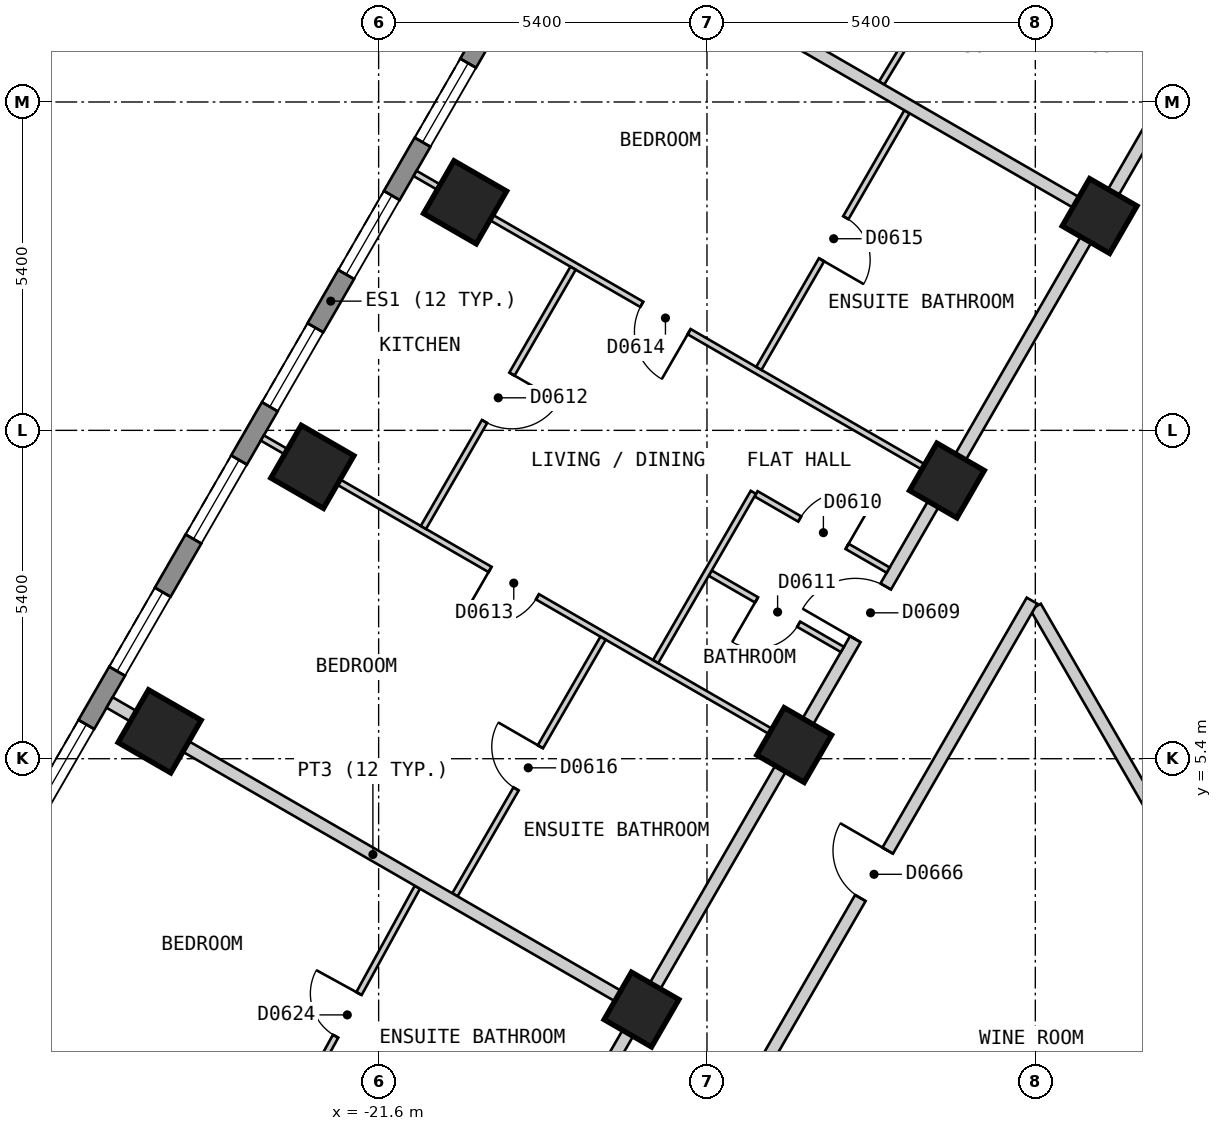
"""IFC4 building model, lengths in metres.
Left out: names, types, materials, properties, quantities, classifications, styles, units other than length and angle.
Written with IfcOpenShell. Run it as: python <this file> out.ifc"""

import sys

from ifc_helpers import new_model, si_unit, direction, frame, frame_2d, origin, origin_2d, place, context, subcontext, project, spatial, polyline, rectangle, outline, extrude, element, fill, save


model = new_model("IFC4")
c1 = context("Model", 3, precision=1e-05, world=origin(), true_north=direction((0.0, 1.0)))
c2 = subcontext(c1, "Body", "Model", "MODEL_VIEW")
j1 = project(units=[si_unit("LENGTHUNIT", "METRE"), si_unit("PLANEANGLEUNIT", "RADIAN")], contexts=[c1])
p1 = place(None, origin())
s1 = spatial("IfcSite", under=j1, at=p1, CompositionType="ELEMENT")
p2 = place(p1, origin())
s2 = spatial("IfcBuilding", under=s1, at=p2, CompositionType="ELEMENT")
p3 = place(p2, frame((0.0, 0.0, 81.0)))
s3 = spatial("IfcBuildingStorey", under=s2, at=p3, CompositionType="ELEMENT", Elevation=81.0)
for number, where, z_axis, x_axis in (
    (1, (-20.178, 14.55, 0.0), (0.0, 0.0, 1.0), (-0.5, -0.866, 0.0)),
    (2, (-22.69, 10.2, 0.0), (0.0, 0.0, 1.0), (-0.5, -0.866, 0.0)),
    (3, (-25.202, 5.85, 0.0), (0.0, 0.0, 1.0), (-0.5, -0.866, 0.0)),
):
    element("IfcColumn", number, at=place(p3, frame(where, z_axis=z_axis, x_axis=x_axis)), inside=s3, PredefinedType="COLUMN", context=c2, shape_type="SweptSolid", body=[
        extrude(rectangle(XDim=1.0, YDim=1.0, at=origin_2d()), origin(), (0.0, 0.0, 1.0), 3.0),
    ])
for number, where, z_axis, x_axis in (
    (4, (-9.743, 14.325, 0.0), (0.0, 0.0, 1.0), (-0.5, -0.866, 0.0)),
    (5, (-12.254, 9.975, 0.0), (0.0, 0.0, 1.0), (-0.5, -0.866, 0.0)),
    (6, (-14.766, 5.625, 0.0), (0.0, 0.0, 1.0), (-0.5, -0.866, 0.0)),
    (7, (-17.277, 1.275, 0.0), (0.0, 0.0, 1.0), (-0.5, -0.866, 0.0)),
):
    element("IfcColumn", number, at=place(p3, frame(where, z_axis=z_axis, x_axis=x_axis)), inside=s3, PredefinedType="COLUMN", context=c2, shape_type="SweptSolid", body=[
        extrude(rectangle(XDim=0.9, YDim=0.9, at=origin_2d()), origin(), (0.0, 0.0, 1.0), 3.0),
    ])
p4 = place(p3, frame((-15.747, 24.425, 0.0), z_axis=(0.0, 0.0, 1.0), x_axis=(-0.500027479704, -0.866009537788, 0.0)))
e8 = element("IfcWall", 8, at=p4, inside=s3, PredefinedType="SOLIDWALL", context=c2, shape_type="SweptSolid", body=[
    extrude(outline(polyline([(0.0, -0.15), (26.559, -0.15), (26.478, 0.15), (0.08, 0.15), (0.0, -0.15)])), origin(), (0.0, 0.0, 1.0), 2.7),
])
p5 = place(p4, frame((1.227, 0.0, 0.15)))
e9 = element("IfcOpeningElement", 9, at=p5, cuts=e8, PredefinedType="OPENING", context=c2, shape_type="SweptSolid", body=[
    extrude(rectangle(XDim=1.5, YDim=2.1, at=frame_2d((0.75, 1.05))), frame((0.0, 0.16, 0.0), z_axis=(0.0, -1.0, 0.0), x_axis=(1.0, 0.0, 0.0)), (0.0, 0.0, 1.0), 0.32),
])
p6 = place(p4, frame((3.739, 0.0, 0.15)))
e10 = element("IfcOpeningElement", 10, at=p6, cuts=e8, PredefinedType="OPENING", context=c2, shape_type="SweptSolid", body=[
    extrude(rectangle(XDim=1.5, YDim=2.1, at=frame_2d((0.75, 1.05))), frame((0.0, 0.16, 0.0), z_axis=(0.0, -1.0, 0.0), x_axis=(1.0, 0.0, 0.0)), (0.0, 0.0, 1.0), 0.32),
])
p7 = place(p4, frame((6.25, 0.0, 0.15)))
e11 = element("IfcOpeningElement", 11, at=p7, cuts=e8, PredefinedType="OPENING", context=c2, shape_type="SweptSolid", body=[
    extrude(rectangle(XDim=1.5, YDim=2.1, at=frame_2d((0.75, 1.05))), frame((0.0, 0.16, 0.0), z_axis=(0.0, -1.0, 0.0), x_axis=(1.0, 0.0, 0.0)), (0.0, 0.0, 1.0), 0.32),
])
p8 = place(p4, frame((8.761, 0.0, 0.15)))
e12 = element("IfcOpeningElement", 12, at=p8, cuts=e8, PredefinedType="OPENING", context=c2, shape_type="SweptSolid", body=[
    extrude(rectangle(XDim=1.5, YDim=2.1, at=frame_2d((0.75, 1.05))), frame((0.0, 0.16, 0.0), z_axis=(0.0, -1.0, 0.0), x_axis=(1.0, 0.0, 0.0)), (0.0, 0.0, 1.0), 0.32),
])
p9 = place(p4, frame((11.273, 0.0, 0.15)))
e13 = element("IfcOpeningElement", 13, at=p9, cuts=e8, PredefinedType="OPENING", context=c2, shape_type="SweptSolid", body=[
    extrude(rectangle(XDim=1.5, YDim=2.1, at=frame_2d((0.75, 1.05))), frame((0.0, 0.16, 0.0), z_axis=(0.0, -1.0, 0.0), x_axis=(1.0, 0.0, 0.0)), (0.0, 0.0, 1.0), 0.32),
])
p10 = place(p4, frame((13.785, 0.0, 0.15)))
e14 = element("IfcOpeningElement", 14, at=p10, cuts=e8, PredefinedType="OPENING", context=c2, shape_type="SweptSolid", body=[
    extrude(rectangle(XDim=1.5, YDim=2.1, at=frame_2d((0.75, 1.05))), frame((0.0, 0.16, 0.0), z_axis=(0.0, -1.0, 0.0), x_axis=(1.0, 0.0, 0.0)), (0.0, 0.0, 1.0), 0.32),
])
p11 = place(p4, frame((16.296, 0.0, 0.15)))
e15 = element("IfcOpeningElement", 15, at=p11, cuts=e8, PredefinedType="OPENING", context=c2, shape_type="SweptSolid", body=[
    extrude(rectangle(XDim=1.5, YDim=2.1, at=frame_2d((0.75, 1.05))), frame((0.0, 0.16, 0.0), z_axis=(0.0, -1.0, 0.0), x_axis=(1.0, 0.0, 0.0)), (0.0, 0.0, 1.0), 0.32),
])
p12 = place(p4, frame((18.807, 0.0, 0.15)))
e16 = element("IfcOpeningElement", 16, at=p12, cuts=e8, PredefinedType="OPENING", context=c2, shape_type="SweptSolid", body=[
    extrude(rectangle(XDim=1.5, YDim=2.1, at=frame_2d((0.75, 1.05))), frame((0.0, 0.16, 0.0), z_axis=(0.0, -1.0, 0.0), x_axis=(1.0, 0.0, 0.0)), (0.0, 0.0, 1.0), 0.32),
])
p13 = place(p4, frame((21.319, 0.0, 0.15)))
e17 = element("IfcOpeningElement", 17, at=p13, cuts=e8, PredefinedType="OPENING", context=c2, shape_type="SweptSolid", body=[
    extrude(rectangle(XDim=1.5, YDim=2.1, at=frame_2d((0.75, 1.05))), frame((0.0, 0.16, 0.0), z_axis=(0.0, -1.0, 0.0), x_axis=(1.0, 0.0, 0.0)), (0.0, 0.0, 1.0), 0.32),
])
p14 = place(p4, frame((23.831, 0.0, 0.15)))
e18 = element("IfcOpeningElement", 18, at=p14, cuts=e8, PredefinedType="OPENING", context=c2, shape_type="SweptSolid", body=[
    extrude(rectangle(XDim=1.5, YDim=2.1, at=frame_2d((0.75, 1.05))), frame((0.0, 0.16, 0.0), z_axis=(0.0, -1.0, 0.0), x_axis=(1.0, 0.0, 0.0)), (0.0, 0.0, 1.0), 0.32),
])
p15 = place(p3, frame((-10.796, 7.899, 0.0), z_axis=(0.0, 0.0, 1.0), x_axis=(0.500010383074, -0.866019409031, 0.0)))
e19 = element("IfcWall", 19, at=p15, inside=s3, PredefinedType="PARTITIONING", context=c2, shape_type="SweptSolid", body=[
    extrude(rectangle(XDim=7.535, YDim=0.2, at=frame_2d((3.768, 0.0))), origin(), (0.0, 0.0, 1.0), 2.7),
])
p16 = place(p3, frame((-16.05, -1.0, 0.0), z_axis=(0.0, 0.0, 1.0), x_axis=(0.499962449088, 0.866047082728, 0.0)))
e20 = element("IfcWall", 20, at=p16, inside=s3, PredefinedType="PARTITIONING", context=c2, shape_type="SweptSolid", body=[
    extrude(rectangle(XDim=10.391, YDim=0.2, at=frame_2d((5.195, 0.0))), origin(), (0.0, 0.0, 1.0), 2.7),
])
p17 = place(p16, frame((4.745, 0.0, 0.0)))
e21 = element("IfcOpeningElement", 21, at=p17, cuts=e20, PredefinedType="OPENING", context=c2, shape_type="SweptSolid", body=[
    extrude(rectangle(XDim=0.9, YDim=2.1, at=frame_2d((0.45, 1.05))), frame((0.0, 0.11, 0.0), z_axis=(0.0, -1.0, 0.0), x_axis=(1.0, 0.0, 0.0)), (0.0, 0.0, 1.0), 0.22),
])
p18 = place(p3, frame((-18.562, -0.951, 0.0), z_axis=(0.0, 0.0, 1.0), x_axis=(0.499992962407, 0.866029466902, 0.0)))
e22 = element("IfcWall", 22, at=p18, inside=s3, PredefinedType="PARTITIONING", context=c2, shape_type="SweptSolid", body=[
    extrude(rectangle(XDim=20.208, YDim=0.2, at=frame_2d((10.104, 0.0))), origin(), (0.0, 0.0, 1.0), 2.7),
])
p19 = place(p18, frame((9.604, 0.0, 0.0)))
e23 = element("IfcOpeningElement", 23, at=p19, cuts=e22, PredefinedType="OPENING", context=c2, shape_type="SweptSolid", body=[
    extrude(rectangle(XDim=1.0, YDim=2.1, at=frame_2d((0.5, 1.05))), frame((0.0, 0.11, 0.0), z_axis=(0.0, -1.0, 0.0), x_axis=(1.0, 0.0, 0.0)), (0.0, 0.0, 1.0), 0.22),
])
p20 = place(p3, frame((-10.742, 20.606, 0.0), z_axis=(0.0, 0.0, 1.0), x_axis=(0.50003312339, -0.866006279142, 0.0)))
e24 = element("IfcWall", 24, at=p20, inside=s3, PredefinedType="PARTITIONING", context=c2, shape_type="SweptSolid", body=[
    extrude(rectangle(XDim=4.626, YDim=0.1, at=frame_2d((2.313, 0.0))), origin(), (0.0, 0.0, 1.0), 2.7),
])
p21 = place(p3, frame((-16.147, 8.452, 0.0), z_axis=(0.0, 0.0, 1.0), x_axis=(0.866080321209, -0.499904868165, 0.0)))
e25 = element("IfcWall", 25, at=p21, inside=s3, PredefinedType="PARTITIONING", context=c2, shape_type="SweptSolid", body=[
    extrude(rectangle(XDim=2.51, YDim=0.1, at=frame_2d((1.255, 0.0))), origin(), (0.0, 0.0, 1.0), 2.7),
])
p22 = place(p21, frame((0.88, 0.0, 0.0)))
e26 = element("IfcOpeningElement", 26, at=p22, cuts=e25, PredefinedType="OPENING", context=c2, shape_type="SweptSolid", body=[
    extrude(rectangle(XDim=0.8, YDim=2.1, at=frame_2d((0.4, 1.05))), frame((0.0, 0.06, 0.0), z_axis=(0.0, -1.0, 0.0), x_axis=(1.0, 0.0, 0.0)), (0.0, 0.0, 1.0), 0.12),
])
p23 = place(p3, frame((-23.513, 10.675, 0.0), z_axis=(0.0, 0.0, 1.0), x_axis=(0.866041268327, -0.499972520799, 0.0)))
e27 = element("IfcWall", 27, at=p23, inside=s3, PredefinedType="PARTITIONING", context=c2, shape_type="SweptSolid", body=[
    extrude(rectangle(XDim=10.0, YDim=0.1, at=frame_2d((5.0, 0.0))), origin(), (0.0, 0.0, 1.0), 2.7),
])
p24 = place(p23, frame((4.325, 0.0, 0.0)))
e28 = element("IfcOpeningElement", 28, at=p24, cuts=e27, PredefinedType="OPENING", context=c2, shape_type="SweptSolid", body=[
    extrude(rectangle(XDim=0.9, YDim=2.1, at=frame_2d((0.45, 1.05))), frame((0.0, 0.06, 0.0), z_axis=(0.0, -1.0, 0.0), x_axis=(1.0, 0.0, 0.0)), (0.0, 0.0, 1.0), 0.12),
])
p25 = place(p3, frame((-15.393, 9.757, 0.0), z_axis=(0.0, 0.0, 1.0), x_axis=(0.865940918122, -0.500146304917, 0.0)))
e29 = element("IfcWall", 29, at=p25, inside=s3, PredefinedType="PARTITIONING", context=c2, shape_type="SweptSolid", body=[
    extrude(rectangle(XDim=2.51, YDim=0.1, at=frame_2d((1.255, 0.0))), origin(), (0.0, 0.0, 1.0), 2.7),
])
p26 = place(p25, frame((0.829, 0.0, 0.0)))
e30 = element("IfcOpeningElement", 30, at=p26, cuts=e29, PredefinedType="OPENING", context=c2, shape_type="SweptSolid", body=[
    extrude(rectangle(XDim=0.9, YDim=2.1, at=frame_2d((0.45, 1.05))), frame((0.0, 0.06, 0.0), z_axis=(0.0, -1.0, 0.0), x_axis=(1.0, 0.0, 0.0)), (0.0, 0.0, 1.0), 0.12),
])
p27 = place(p3, frame((-21.001, 15.025, 0.0), z_axis=(0.0, 0.0, 1.0), x_axis=(0.866016855193, -0.500014806302, 0.0)))
e31 = element("IfcWall", 31, at=p27, inside=s3, PredefinedType="PARTITIONING", context=c2, shape_type="SweptSolid", body=[
    extrude(rectangle(XDim=10.0, YDim=0.1, at=frame_2d((5.0, 0.0))), origin(), (0.0, 0.0, 1.0), 2.7),
])
p28 = place(p27, frame((4.305, 0.0, 0.0)))
e32 = element("IfcOpeningElement", 32, at=p28, cuts=e31, PredefinedType="OPENING", context=c2, shape_type="SweptSolid", body=[
    extrude(rectangle(XDim=0.9, YDim=2.1, at=frame_2d((0.45, 1.05))), frame((0.0, 0.06, 0.0), z_axis=(0.0, -1.0, 0.0), x_axis=(1.0, 0.0, 0.0)), (0.0, 0.0, 1.0), 0.12),
])
p29 = place(p3, frame((-13.328, 16.511, 0.0), z_axis=(0.0, 0.0, 1.0), x_axis=(0.518570528669, 0.855034857065, 0.0)))
e33 = element("IfcWall", 33, at=p29, inside=s3, PredefinedType="PARTITIONING", context=c2, shape_type="SweptSolid", body=[
    extrude(rectangle(XDim=4.83, YDim=0.1, at=frame_2d((2.415, 0.0))), origin(), (0.0, 0.0, 1.0), 2.7),
])
p30 = place(p29, frame((1.995, 0.0, 0.0)))
e34 = element("IfcOpeningElement", 34, at=p30, cuts=e33, PredefinedType="OPENING", context=c2, shape_type="SweptSolid", body=[
    extrude(rectangle(XDim=0.8, YDim=2.1, at=frame_2d((0.4, 1.05))), frame((0.0, 0.06, 0.0), z_axis=(0.0, -1.0, 0.0), x_axis=(1.0, 0.0, 0.0)), (0.0, 0.0, 1.0), 0.12),
])
p31 = place(p3, frame((-17.044, 6.999, 0.0), z_axis=(0.0, 0.0, 1.0), x_axis=(0.500176309913, 0.865923587277, 0.0)))
e35 = element("IfcWall", 35, at=p31, inside=s3, PredefinedType="PARTITIONING", context=c2, shape_type="SweptSolid", body=[
    extrude(rectangle(XDim=3.213, YDim=0.1, at=frame_2d((1.606, 0.0))), origin(), (0.0, 0.0, 1.0), 2.7),
])
p32 = place(p3, frame((-20.345, 3.162, 0.0), z_axis=(0.0, 0.0, 1.0), x_axis=(0.499943653708, 0.866057932887, 0.0)))
e36 = element("IfcWall", 36, at=p32, inside=s3, PredefinedType="PARTITIONING", context=c2, shape_type="SweptSolid", body=[
    extrude(rectangle(XDim=4.873, YDim=0.1, at=frame_2d((2.436, 0.0))), origin(), (0.0, 0.0, 1.0), 2.7),
])
p33 = place(p32, frame((2.011, 0.0, 0.0)))
e37 = element("IfcOpeningElement", 37, at=p33, cuts=e36, PredefinedType="OPENING", context=c2, shape_type="SweptSolid", body=[
    extrude(rectangle(XDim=0.8, YDim=2.1, at=frame_2d((0.4, 1.05))), frame((0.0, 0.06, 0.0), z_axis=(0.0, -1.0, 0.0), x_axis=(1.0, 0.0, 0.0)), (0.0, 0.0, 1.0), 0.12),
])
p34 = place(p3, frame((-15.347, 11.819, 0.0), z_axis=(0.0, 0.0, 1.0), x_axis=(0.499943653708, 0.866057932887, 0.0)))
e38 = element("IfcWall", 38, at=p34, inside=s3, PredefinedType="PARTITIONING", context=c2, shape_type="SweptSolid", body=[
    extrude(rectangle(XDim=4.873, YDim=0.1, at=frame_2d((2.436, 0.0))), origin(), (0.0, 0.0, 1.0), 2.7),
])
p35 = place(p34, frame((2.062, 0.0, 0.0)))
e39 = element("IfcOpeningElement", 39, at=p35, cuts=e38, PredefinedType="OPENING", context=c2, shape_type="SweptSolid", body=[
    extrude(rectangle(XDim=0.8, YDim=2.1, at=frame_2d((0.4, 1.05))), frame((0.0, 0.06, 0.0), z_axis=(0.0, -1.0, 0.0), x_axis=(1.0, 0.0, 0.0)), (0.0, 0.0, 1.0), 0.12),
])
p36 = place(p3, frame((-20.864, 9.203, 0.0), z_axis=(0.0, 0.0, 1.0), x_axis=(0.500000007376, 0.866025399526, 0.0)))
e40 = element("IfcWall", 40, at=p36, inside=s3, PredefinedType="PARTITIONING", context=c2, shape_type="SweptSolid", body=[
    extrude(rectangle(XDim=4.924, YDim=0.1, at=frame_2d((2.462, 0.0))), origin(), (0.0, 0.0, 1.0), 2.7),
])
p37 = place(p36, frame((2.012, 0.0, 0.0)))
e41 = element("IfcOpeningElement", 41, at=p37, cuts=e40, PredefinedType="OPENING", context=c2, shape_type="SweptSolid", body=[
    extrude(rectangle(XDim=0.9, YDim=2.1, at=frame_2d((0.45, 1.05))), frame((0.0, 0.06, 0.0), z_axis=(0.0, -1.0, 0.0), x_axis=(1.0, 0.0, 0.0)), (0.0, 0.0, 1.0), 0.12),
])
p38 = place(p3, frame((-23.289, -0.951, 0.0), z_axis=(0.0, 0.0, 1.0), x_axis=(0.481164463081, 0.876630343684, 0.0)))
e42 = element("IfcWall", 42, at=p38, inside=s3, PredefinedType="PARTITIONING", context=c2, shape_type="SweptSolid", body=[
    extrude(rectangle(XDim=4.834, YDim=0.1, at=frame_2d((2.417, 0.0))), origin(), (0.0, 0.0, 1.0), 2.7),
])
p39 = place(p38, frame((2.039, 0.0, 0.0)))
e43 = element("IfcOpeningElement", 43, at=p39, cuts=e42, PredefinedType="OPENING", context=c2, shape_type="SweptSolid", body=[
    extrude(rectangle(XDim=0.8, YDim=2.1, at=frame_2d((0.4, 1.05))), frame((0.0, 0.06, 0.0), z_axis=(0.0, -1.0, 0.0), x_axis=(1.0, 0.0, 0.0)), (0.0, 0.0, 1.0), 0.12),
])
p40 = place(p3, frame((-26.025, 6.325, 0.0), z_axis=(0.0, 0.0, 1.0), x_axis=(0.866041268327, -0.499972520799, 0.0)))
e44 = element("IfcWall", 44, at=p40, inside=s3, PredefinedType="PARTITIONING", context=c2, shape_type="SweptSolid", body=[
    extrude(rectangle(XDim=10.0, YDim=0.2, at=frame_2d((5.0, 0.0))), origin(), (0.0, 0.0, 1.0), 2.7),
])
p41 = place(p3, frame((-18.489, 19.375, 0.0), z_axis=(0.0, 0.0, 1.0), x_axis=(0.866016855193, -0.500014806302, 0.0)))
e45 = element("IfcWall", 45, at=p41, inside=s3, PredefinedType="PARTITIONING", context=c2, shape_type="SweptSolid", body=[
    extrude(rectangle(XDim=10.0, YDim=0.2, at=frame_2d((5.0, 0.0))), origin(), (0.0, 0.0, 1.0), 2.7),
])
p42 = place(p8, origin())
e46 = element("IfcWindow", 46, at=p42, inside=s3, PartitioningType="SINGLE_PANEL", PredefinedType="WINDOW", context=c2, shape_type="SweptSolid", body=[
    extrude(rectangle(XDim=1.5, YDim=2.1, at=frame_2d((0.75, 1.05))), frame((0.0, 0.03, 0.0), z_axis=(0.0, -1.0, 0.0), x_axis=(1.0, 0.0, 0.0)), (0.0, 0.0, 1.0), 0.06),
])
fill(e12, e46)
p43 = place(p9, origin())
e47 = element("IfcWindow", 47, at=p43, inside=s3, PartitioningType="SINGLE_PANEL", PredefinedType="WINDOW", context=c2, shape_type="SweptSolid", body=[
    extrude(rectangle(XDim=1.5, YDim=2.1, at=frame_2d((0.75, 1.05))), frame((0.0, 0.03, 0.0), z_axis=(0.0, -1.0, 0.0), x_axis=(1.0, 0.0, 0.0)), (0.0, 0.0, 1.0), 0.06),
])
fill(e13, e47)
p44 = place(p10, origin())
e48 = element("IfcWindow", 48, at=p44, inside=s3, PartitioningType="SINGLE_PANEL", PredefinedType="WINDOW", context=c2, shape_type="SweptSolid", body=[
    extrude(rectangle(XDim=1.5, YDim=2.1, at=frame_2d((0.75, 1.05))), frame((0.0, 0.03, 0.0), z_axis=(0.0, -1.0, 0.0), x_axis=(1.0, 0.0, 0.0)), (0.0, 0.0, 1.0), 0.06),
])
fill(e14, e48)
p45 = place(p11, origin())
e49 = element("IfcWindow", 49, at=p45, inside=s3, PartitioningType="SINGLE_PANEL", PredefinedType="WINDOW", context=c2, shape_type="SweptSolid", body=[
    extrude(rectangle(XDim=1.5, YDim=2.1, at=frame_2d((0.75, 1.05))), frame((0.0, 0.03, 0.0), z_axis=(0.0, -1.0, 0.0), x_axis=(1.0, 0.0, 0.0)), (0.0, 0.0, 1.0), 0.06),
])
fill(e15, e49)
p46 = place(p12, origin())
e50 = element("IfcWindow", 50, at=p46, inside=s3, PartitioningType="SINGLE_PANEL", PredefinedType="WINDOW", context=c2, shape_type="SweptSolid", body=[
    extrude(rectangle(XDim=1.5, YDim=2.1, at=frame_2d((0.75, 1.05))), frame((0.0, 0.03, 0.0), z_axis=(0.0, -1.0, 0.0), x_axis=(1.0, 0.0, 0.0)), (0.0, 0.0, 1.0), 0.06),
])
fill(e16, e50)
p47 = place(p13, origin())
e51 = element("IfcWindow", 51, at=p47, inside=s3, PartitioningType="SINGLE_PANEL", PredefinedType="WINDOW", context=c2, shape_type="SweptSolid", body=[
    extrude(rectangle(XDim=1.5, YDim=2.1, at=frame_2d((0.75, 1.05))), frame((0.0, 0.03, 0.0), z_axis=(0.0, -1.0, 0.0), x_axis=(1.0, 0.0, 0.0)), (0.0, 0.0, 1.0), 0.06),
])
fill(e17, e51)
p48 = place(p19, origin())
e52 = element("IfcDoor", 52, at=p48, inside=s3, OperationType="SINGLE_SWING_LEFT", PredefinedType="DOOR", context=c2, shape_type="SweptSolid", body=[
    extrude(rectangle(XDim=1.0, YDim=2.1, at=frame_2d((0.5, 1.05))), frame((0.0, 0.025, 0.0), z_axis=(0.0, -1.0, 0.0), x_axis=(1.0, 0.0, 0.0)), (0.0, 0.0, 1.0), 0.05),
])
fill(e23, e52)
p49 = place(p26, origin())
e53 = element("IfcDoor", 53, at=p49, inside=s3, OperationType="SINGLE_SWING_RIGHT", PredefinedType="DOOR", context=c2, shape_type="SweptSolid", body=[
    extrude(rectangle(XDim=0.9, YDim=2.1, at=frame_2d((0.45, 1.05))), frame((0.0, 0.025, 0.0), z_axis=(0.0, -1.0, 0.0), x_axis=(1.0, 0.0, 0.0)), (0.0, 0.0, 1.0), 0.05),
])
fill(e30, e53)
p50 = place(p22, origin())
e54 = element("IfcDoor", 54, at=p50, inside=s3, OperationType="SINGLE_SWING_LEFT", PredefinedType="DOOR", context=c2, shape_type="SweptSolid", body=[
    extrude(rectangle(XDim=0.8, YDim=2.1, at=frame_2d((0.4, 1.05))), frame((0.0, 0.025, 0.0), z_axis=(0.0, -1.0, 0.0), x_axis=(1.0, 0.0, 0.0)), (0.0, 0.0, 1.0), 0.05),
])
fill(e26, e54)
p51 = place(p37, origin())
e55 = element("IfcDoor", 55, at=p51, inside=s3, OperationType="SINGLE_SWING_RIGHT", PredefinedType="DOOR", context=c2, shape_type="SweptSolid", body=[
    extrude(rectangle(XDim=0.9, YDim=2.1, at=frame_2d((0.45, 1.05))), frame((0.0, 0.025, 0.0), z_axis=(0.0, -1.0, 0.0), x_axis=(1.0, 0.0, 0.0)), (0.0, 0.0, 1.0), 0.05),
])
fill(e41, e55)
p52 = place(p24, origin())
e56 = element("IfcDoor", 56, at=p52, inside=s3, OperationType="SINGLE_SWING_LEFT", PredefinedType="DOOR", context=c2, shape_type="SweptSolid", body=[
    extrude(rectangle(XDim=0.9, YDim=2.1, at=frame_2d((0.45, 1.05))), frame((0.0, 0.025, 0.0), z_axis=(0.0, -1.0, 0.0), x_axis=(1.0, 0.0, 0.0)), (0.0, 0.0, 1.0), 0.05),
])
fill(e28, e56)
p53 = place(p28, origin())
e57 = element("IfcDoor", 57, at=p53, inside=s3, OperationType="SINGLE_SWING_RIGHT", PredefinedType="DOOR", context=c2, shape_type="SweptSolid", body=[
    extrude(rectangle(XDim=0.9, YDim=2.1, at=frame_2d((0.45, 1.05))), frame((0.0, 0.025, 0.0), z_axis=(0.0, -1.0, 0.0), x_axis=(1.0, 0.0, 0.0)), (0.0, 0.0, 1.0), 0.05),
])
fill(e32, e57)
p54 = place(p35, origin())
e58 = element("IfcDoor", 58, at=p54, inside=s3, OperationType="SINGLE_SWING_LEFT", PredefinedType="DOOR", context=c2, shape_type="SweptSolid", body=[
    extrude(rectangle(XDim=0.8, YDim=2.1, at=frame_2d((0.4, 1.05))), frame((0.0, 0.025, 0.0), z_axis=(0.0, -1.0, 0.0), x_axis=(1.0, 0.0, 0.0)), (0.0, 0.0, 1.0), 0.05),
])
fill(e39, e58)
p55 = place(p33, origin())
e59 = element("IfcDoor", 59, at=p55, inside=s3, OperationType="SINGLE_SWING_RIGHT", PredefinedType="DOOR", context=c2, shape_type="SweptSolid", body=[
    extrude(rectangle(XDim=0.8, YDim=2.1, at=frame_2d((0.4, 1.05))), frame((0.0, 0.025, 0.0), z_axis=(0.0, -1.0, 0.0), x_axis=(1.0, 0.0, 0.0)), (0.0, 0.0, 1.0), 0.05),
])
fill(e37, e59)
p56 = place(p39, origin())
e60 = element("IfcDoor", 60, at=p56, inside=s3, OperationType="SINGLE_SWING_RIGHT", PredefinedType="DOOR", context=c2, shape_type="SweptSolid", body=[
    extrude(rectangle(XDim=0.8, YDim=2.1, at=frame_2d((0.4, 1.05))), frame((0.0, 0.025, 0.0), z_axis=(0.0, -1.0, 0.0), x_axis=(1.0, 0.0, 0.0)), (0.0, 0.0, 1.0), 0.05),
])
fill(e43, e60)
p57 = place(p17, origin())
e61 = element("IfcDoor", 61, at=p57, inside=s3, OperationType="SINGLE_SWING_RIGHT", PredefinedType="DOOR", context=c2, shape_type="SweptSolid", body=[
    extrude(rectangle(XDim=0.9, YDim=2.1, at=frame_2d((0.45, 1.05))), frame((0.0, 0.025, 0.0), z_axis=(0.0, -1.0, 0.0), x_axis=(1.0, 0.0, 0.0)), (0.0, 0.0, 1.0), 0.05),
])
fill(e21, e61)
save(model, sys.argv[1])
